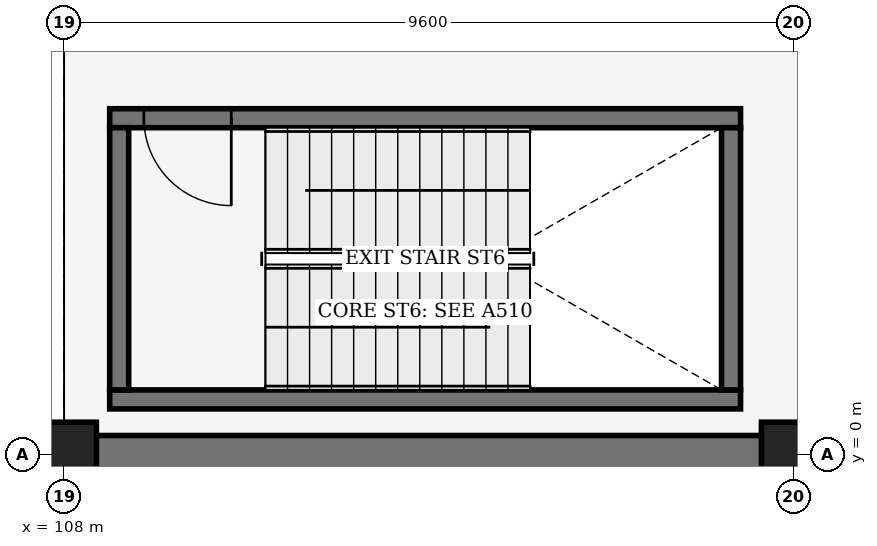
"""IFC4 building model, lengths in metres.
Left out: names, types, materials, properties, quantities, classifications, styles, units other than length and angle.
Written with IfcOpenShell. Run it as: python <this file> out.ifc"""

import sys

from ifc_helpers import new_model, si_unit, direction, frame, frame_2d, origin, origin_2d, place, context, subcontext, project, spatial, rectangle, extrude, element, fill, save


model = new_model("IFC4")
c1 = context("Model", 3, precision=1e-05, world=origin(), true_north=direction((0.0, 1.0)))
c2 = subcontext(c1, "Body", "Model", "MODEL_VIEW")
j1 = project(units=[si_unit("LENGTHUNIT", "METRE"), si_unit("PLANEANGLEUNIT", "RADIAN")], contexts=[c1])
p1 = place(None, origin())
s1 = spatial("IfcSite", under=j1, at=p1, CompositionType="ELEMENT")
p2 = place(p1, origin())
s2 = spatial("IfcBuilding", under=s1, at=p2, CompositionType="ELEMENT")
p3 = place(p2, frame((0.0, 0.0, -4.8)))
s3 = spatial("IfcBuildingStorey", under=s2, at=p3, CompositionType="ELEMENT", Elevation=-4.8)
for number, where, z_axis, x_axis in (
    (1, (108.0, 0.0, 0.0), (0.0, 0.0, 1.0), (1.0, 0.0, 0.0)),
    (2, (117.6, 0.0, 0.0), (0.0, 0.0, 1.0), (1.0, 0.0, 0.0)),
):
    element("IfcColumn", number, at=place(p3, frame(where, z_axis=z_axis, x_axis=x_axis)), inside=s3, PredefinedType="COLUMN", context=c2, shape_type="SweptSolid", body=[
        extrude(rectangle(XDim=0.85, YDim=0.85, at=origin_2d()), origin(), (0.0, 0.0, 1.0), 4.8),
    ])
p4 = place(p3, frame((122.64, 0.0, 0.0), z_axis=(0.0, 0.0, 1.0), x_axis=(-1.0, 0.0, 0.0)))
e3 = element("IfcWall", 3, at=p4, inside=s3, PredefinedType="USERDEFINED", context=c2, shape_type="SweptSolid", body=[
    extrude(rectangle(XDim=17.52, YDim=0.5, at=frame_2d((8.76, 0.0))), origin(), (0.0, 0.0, 1.0), 4.5),
])
p5 = place(p3, frame((108.6, 0.725, 0.0), z_axis=(0.0, 0.0, 1.0), x_axis=(1.0, 0.0, 0.0)))
e4 = element("IfcWall", 4, at=p5, inside=s3, PredefinedType="SHEAR", context=c2, shape_type="SweptSolid", body=[
    extrude(rectangle(XDim=8.3, YDim=0.25, at=frame_2d((4.15, 0.0))), origin(), (0.0, 0.0, 1.0), 4.45),
])
p6 = place(p3, frame((116.9, 4.425, 0.0), z_axis=(0.0, 0.0, 1.0), x_axis=(-1.0, 0.0, 0.0)))
e5 = element("IfcWall", 5, at=p6, inside=s3, PredefinedType="SHEAR", context=c2, shape_type="SweptSolid", body=[
    extrude(rectangle(XDim=8.3, YDim=0.25, at=frame_2d((4.15, 0.0))), origin(), (0.0, 0.0, 1.0), 4.45),
])
p7 = place(p6, frame((7.85, 0.0, 0.0), z_axis=(0.0, 0.0, 1.0), x_axis=(-1.0, 0.0, 0.0)))
e6 = element("IfcOpeningElement", 6, at=p7, cuts=e5, PredefinedType="OPENING", context=c2, shape_type="SweptSolid", body=[
    extrude(rectangle(XDim=1.15, YDim=2.2, at=frame_2d((0.575, 1.1))), frame((0.0, 0.135, 0.0), z_axis=(0.0, -1.0, 0.0), x_axis=(1.0, 0.0, 0.0)), (0.0, 0.0, 1.0), 0.27),
])
for number, where, z_axis, x_axis in (
    (7, (108.725, 4.3, 0.0), (0.0, 0.0, 1.0), (0.0, -1.0, 0.0)),
    (8, (116.775, 0.85, 0.0), (0.0, 0.0, 1.0), (0.0, 1.0, 0.0)),
):
    element("IfcWall", number, at=place(p3, frame(where, z_axis=z_axis, x_axis=x_axis)), inside=s3, PredefinedType="SHEAR", context=c2, shape_type="SweptSolid", body=[
        extrude(rectangle(XDim=3.45, YDim=0.25, at=frame_2d((1.725, 0.0))), origin(), (0.0, 0.0, 1.0), 4.45),
    ])
p8 = place(p7, origin())
e9 = element("IfcDoor", 9, at=p8, inside=s3, OperationType="SINGLE_SWING_RIGHT", PredefinedType="DOOR", context=c2, shape_type="SweptSolid", body=[
    extrude(rectangle(XDim=1.15, YDim=2.2, at=frame_2d((0.575, 1.1))), frame((0.0, 0.025, 0.0), z_axis=(0.0, -1.0, 0.0), x_axis=(1.0, 0.0, 0.0)), (0.0, 0.0, 1.0), 0.05),
])
fill(e6, e9)
save(model, sys.argv[1])
